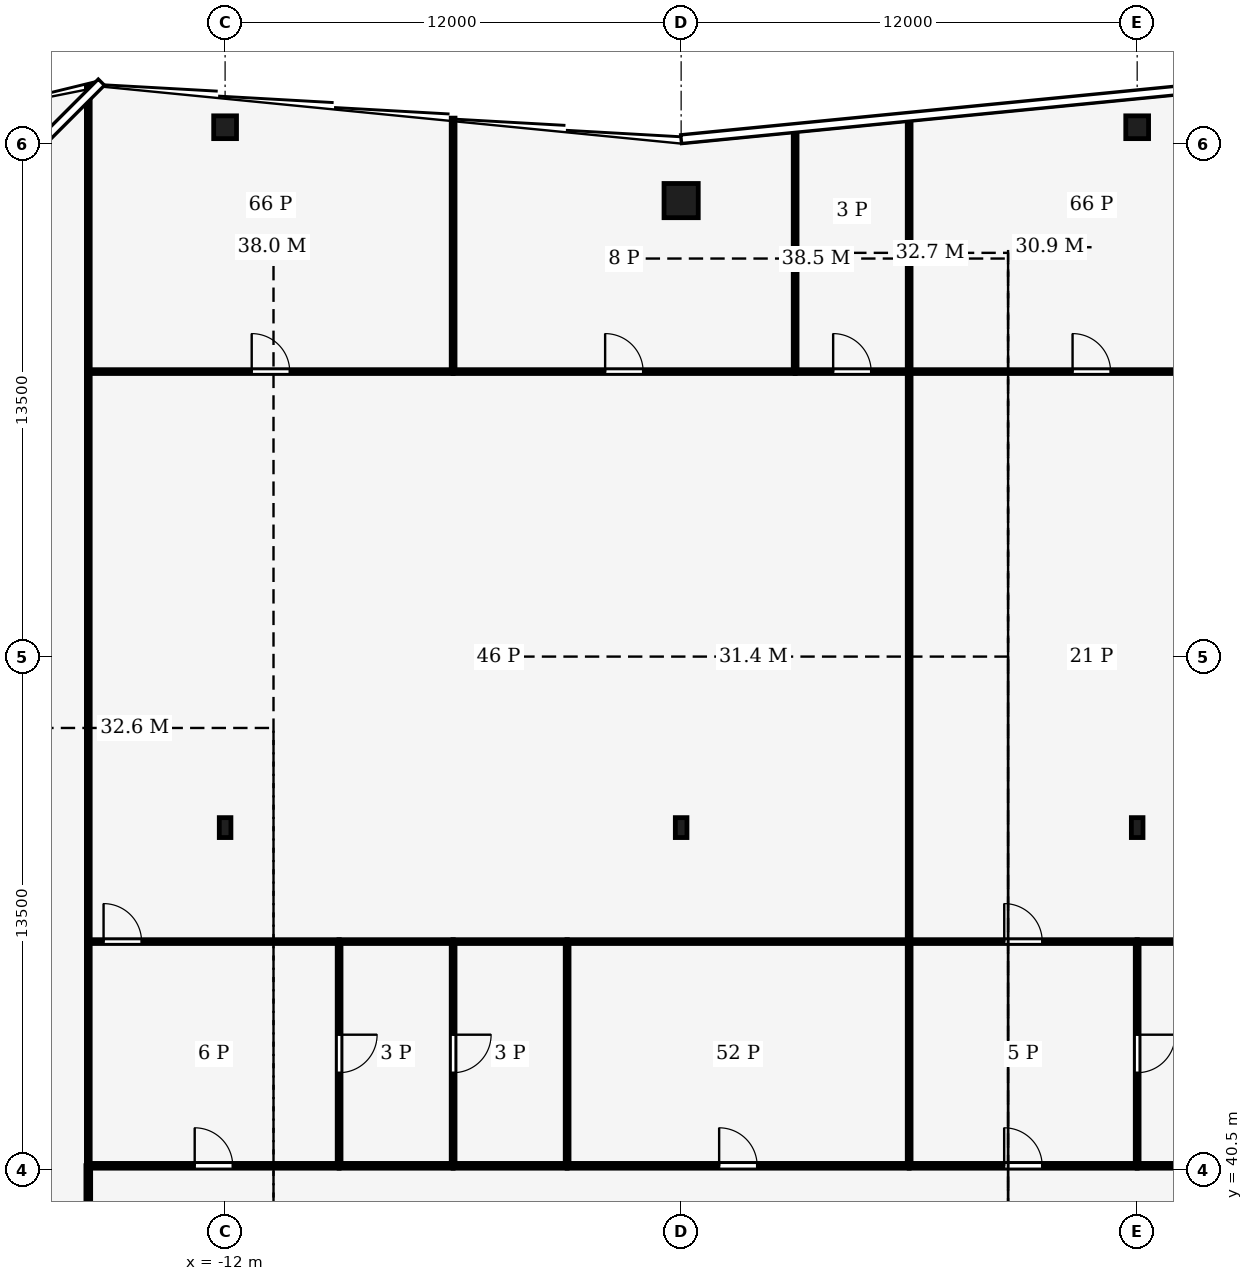
"""IFC4 building model, lengths in metres.
Left out: names, types, materials, properties, quantities, classifications, styles, units other than length and angle.
Written with IfcOpenShell. Run it as: python <this file> out.ifc"""

import sys

from ifc_helpers import new_model, si_unit, direction, frame, frame_2d, origin, origin_2d, place, context, subcontext, project, spatial, rectangle, hollow_rectangle, i_section, extrude, element, fill, save


model = new_model("IFC4")
c1 = context("Model", 3, precision=1e-05, world=origin(), true_north=direction((0.0, 1.0)))
c2 = subcontext(c1, "Body", "Model", "MODEL_VIEW")
j1 = project(units=[si_unit("LENGTHUNIT", "METRE"), si_unit("PLANEANGLEUNIT", "RADIAN")], contexts=[c1])
p1 = place(None, origin())
s1 = spatial("IfcSite", under=j1, at=p1, CompositionType="ELEMENT")
p2 = place(p1, origin())
s2 = spatial("IfcBuilding", under=s1, at=p2, CompositionType="ELEMENT")
p3 = place(p2, frame((0.0, 0.0, 314.0)))
s3 = spatial("IfcBuildingStorey", under=s2, at=p3, CompositionType="ELEMENT", Elevation=314.0)
p4 = place(p3, frame((0.0, 66.0, 0.0), z_axis=(0.0, 0.0, 1.0), x_axis=(1.0, 0.0, 0.0)))
e1 = element("IfcColumn", 1, at=p4, inside=s3, PredefinedType="COLUMN", context=c2, shape_type="SweptSolid", body=[
    extrude(hollow_rectangle(XDim=0.9, YDim=0.9, WallThickness=0.04, at=origin_2d()), origin(), (0.0, 0.0, 1.0), 4.0),
])
for number, where, z_axis, x_axis in (
    (2, (-12.0, 67.93, 0.0), (0.0, 0.0, 1.0), (1.0, 0.0, 0.0)),
    (3, (12.0, 67.93, 0.0), (0.0, 0.0, 1.0), (1.0, 0.0, 0.0)),
):
    element("IfcColumn", number, at=place(p3, frame(where, z_axis=z_axis, x_axis=x_axis)), inside=s3, PredefinedType="COLUMN", context=c2, shape_type="SweptSolid", body=[
        extrude(hollow_rectangle(XDim=0.6, YDim=0.6, WallThickness=0.025, at=origin_2d()), origin(), (0.0, 0.0, 1.0), 4.0),
    ])
for number, where, z_axis, x_axis in (
    (4, (-12.0, 49.5, 0.0), (0.0, 0.0, 1.0), (1.0, 0.0, 0.0)),
    (5, (0.0, 49.5, 0.0), (0.0, 0.0, 1.0), (1.0, 0.0, 0.0)),
    (6, (12.0, 49.5, 0.0), (0.0, 0.0, 1.0), (1.0, 0.0, 0.0)),
):
    element("IfcColumn", number, at=place(p3, frame(where, z_axis=z_axis, x_axis=x_axis)), inside=s3, PredefinedType="COLUMN", context=c2, shape_type="SweptSolid", body=[
        extrude(i_section(OverallWidth=0.306, OverallDepth=0.524, WebThickness=0.012, FlangeThickness=0.04, FilletRadius=0.027, at=origin_2d()), origin(), (0.0, 0.0, 1.0), 4.0),
    ])
p5 = place(p3, frame((-15.6, 34.5, 0.0), z_axis=(0.0, 0.0, 1.0), x_axis=(0.0, 1.0, 0.0)))
e7 = element("IfcWall", 7, at=p5, inside=s3, PredefinedType="PARTITIONING", context=c2, shape_type="SweptSolid", body=[
    extrude(rectangle(XDim=6.104, YDim=0.125, at=frame_2d((3.052, 0.0))), origin(), (0.0, 0.0, 1.0), 3.14),
])
p6 = place(p5, frame((2.552, 0.0, 0.0)))
e8 = element("IfcOpeningElement", 8, at=p6, cuts=e7, PredefinedType="OPENING", context=c2, shape_type="SweptSolid", body=[
    extrude(rectangle(XDim=1.0, YDim=2.1, at=frame_2d((0.5, 1.05))), frame((0.0, 0.073, 0.0), z_axis=(0.0, -1.0, 0.0), x_axis=(1.0, 0.0, 0.0)), (0.0, 0.0, 1.0), 0.145),
])
p7 = place(p3, frame((-15.6, 40.6, 0.0), z_axis=(0.0, 0.0, 1.0), x_axis=(1.0, 0.0, 0.0)))
e9 = element("IfcWall", 9, at=p7, inside=s3, PredefinedType="PARTITIONING", context=c2, shape_type="SweptSolid", body=[
    extrude(rectangle(XDim=6.6, YDim=0.125, at=frame_2d((3.3, 0.0))), origin(), (0.0, 0.0, 1.0), 3.39),
])
p8 = place(p7, frame((2.8, 0.0, 0.0)))
e10 = element("IfcOpeningElement", 10, at=p8, cuts=e9, PredefinedType="OPENING", context=c2, shape_type="SweptSolid", body=[
    extrude(rectangle(XDim=1.0, YDim=2.1, at=frame_2d((0.5, 1.05))), frame((0.0, 0.073, 0.0), z_axis=(0.0, -1.0, 0.0), x_axis=(1.0, 0.0, 0.0)), (0.0, 0.0, 1.0), 0.145),
])
for number, where, z_axis, x_axis in (
    (11, (-6.0, 40.6, 0.0), (0.0, 0.0, 1.0), (-1.0, 0.0, 0.0)),
    (12, (-3.0, 40.6, 0.0), (0.0, 0.0, 1.0), (-1.0, 0.0, 0.0)),
):
    element("IfcWall", number, at=place(p3, frame(where, z_axis=z_axis, x_axis=x_axis)), inside=s3, PredefinedType="PARTITIONING", context=c2, shape_type="SweptSolid", body=[
        extrude(rectangle(XDim=3.0, YDim=0.125, at=frame_2d((1.5, 0.0))), origin(), (0.0, 0.0, 1.0), 3.39),
    ])
p9 = place(p3, frame((-3.0, 40.6, 0.0), z_axis=(0.0, 0.0, 1.0), x_axis=(1.0, 0.0, 0.0)))
e13 = element("IfcWall", 13, at=p9, inside=s3, PredefinedType="PARTITIONING", context=c2, shape_type="SweptSolid", body=[
    extrude(rectangle(XDim=9.0, YDim=0.125, at=frame_2d((4.5, 0.0))), origin(), (0.0, 0.0, 1.0), 3.39),
])
p10 = place(p9, frame((4.0, 0.0, 0.0)))
e14 = element("IfcOpeningElement", 14, at=p10, cuts=e13, PredefinedType="OPENING", context=c2, shape_type="SweptSolid", body=[
    extrude(rectangle(XDim=1.0, YDim=2.1, at=frame_2d((0.5, 1.05))), frame((0.0, 0.073, 0.0), z_axis=(0.0, -1.0, 0.0), x_axis=(1.0, 0.0, 0.0)), (0.0, 0.0, 1.0), 0.145),
])
p11 = place(p3, frame((6.0, 40.6, 0.0), z_axis=(0.0, 0.0, 1.0), x_axis=(1.0, 0.0, 0.0)))
e15 = element("IfcWall", 15, at=p11, inside=s3, PredefinedType="PARTITIONING", context=c2, shape_type="SweptSolid", body=[
    extrude(rectangle(XDim=6.0, YDim=0.125, at=frame_2d((3.0, 0.0))), origin(), (0.0, 0.0, 1.0), 3.39),
])
p12 = place(p11, frame((2.5, 0.0, 0.0)))
e16 = element("IfcOpeningElement", 16, at=p12, cuts=e15, PredefinedType="OPENING", context=c2, shape_type="SweptSolid", body=[
    extrude(rectangle(XDim=1.0, YDim=2.1, at=frame_2d((0.5, 1.05))), frame((0.0, 0.073, 0.0), z_axis=(0.0, -1.0, 0.0), x_axis=(1.0, 0.0, 0.0)), (0.0, 0.0, 1.0), 0.145),
])
p13 = place(p3, frame((15.6, 40.6, 0.0), z_axis=(0.0, 0.0, 1.0), x_axis=(-1.0, 0.0, 0.0)))
e17 = element("IfcWall", 17, at=p13, inside=s3, PredefinedType="PARTITIONING", context=c2, shape_type="SweptSolid", body=[
    extrude(rectangle(XDim=3.6, YDim=0.125, at=frame_2d((1.8, 0.0))), origin(), (0.0, 0.0, 1.0), 3.39),
])
p14 = place(p3, frame((-15.6, 40.6, 0.0), z_axis=(0.0, 0.0, 1.0), x_axis=(0.0, 1.0, 0.0)))
e18 = element("IfcWall", 18, at=p14, inside=s3, PredefinedType="PARTITIONING", context=c2, shape_type="SweptSolid", body=[
    extrude(rectangle(XDim=5.9, YDim=0.1, at=frame_2d((2.95, 0.0))), origin(), (0.0, 0.0, 1.0), 3.87),
])
p15 = place(p3, frame((-15.6, 46.5, 0.0), z_axis=(0.0, 0.0, 1.0), x_axis=(0.0, 1.0, 0.0)))
e19 = element("IfcWall", 19, at=p15, inside=s3, PredefinedType="PARTITIONING", context=c2, shape_type="SweptSolid", body=[
    extrude(rectangle(XDim=15.0, YDim=0.1, at=frame_2d((7.5, 0.0))), origin(), (0.0, 0.0, 1.0), 3.35),
])
p16 = place(p3, frame((-15.6, 61.5, 0.0), z_axis=(0.0, 0.0, 1.0), x_axis=(0.0, 1.0, 0.0)))
e20 = element("IfcWall", 20, at=p16, inside=s3, PredefinedType="PARTITIONING", context=c2, shape_type="SweptSolid", body=[
    extrude(rectangle(XDim=7.51, YDim=0.1, at=frame_2d((3.755, 0.0))), origin(), (0.0, 0.0, 1.0), 2.93),
])
p17 = place(p3, frame((-9.0, 46.5, 0.0), z_axis=(0.0, 0.0, 1.0), x_axis=(0.0, -1.0, 0.0)))
e21 = element("IfcWall", 21, at=p17, inside=s3, PredefinedType="PARTITIONING", context=c2, shape_type="SweptSolid", body=[
    extrude(rectangle(XDim=5.9, YDim=0.1, at=frame_2d((2.95, 0.0))), origin(), (0.0, 0.0, 1.0), 3.87),
])
p18 = place(p17, frame((2.45, 0.0, 0.0)))
e22 = element("IfcOpeningElement", 22, at=p18, cuts=e21, PredefinedType="OPENING", context=c2, shape_type="SweptSolid", body=[
    extrude(rectangle(XDim=1.0, YDim=2.1, at=frame_2d((0.5, 1.05))), frame((0.0, 0.06, 0.0), z_axis=(0.0, -1.0, 0.0), x_axis=(1.0, 0.0, 0.0)), (0.0, 0.0, 1.0), 0.12),
])
p19 = place(p3, frame((-15.6, 46.5, 0.0), z_axis=(0.0, 0.0, 1.0), x_axis=(1.0, 0.0, 0.0)))
e23 = element("IfcWall", 23, at=p19, inside=s3, PredefinedType="PARTITIONING", context=c2, shape_type="SweptSolid", body=[
    extrude(rectangle(XDim=6.604, YDim=0.1, at=frame_2d((3.302, 0.0))), origin(), (0.0, 0.0, 1.0), 3.39),
])
p20 = place(p19, frame((0.402, 0.0, 0.0)))
e24 = element("IfcOpeningElement", 24, at=p20, cuts=e23, PredefinedType="OPENING", context=c2, shape_type="SweptSolid", body=[
    extrude(rectangle(XDim=1.0, YDim=2.1, at=frame_2d((0.5, 1.05))), frame((0.0, 0.06, 0.0), z_axis=(0.0, -1.0, 0.0), x_axis=(1.0, 0.0, 0.0)), (0.0, 0.0, 1.0), 0.12),
])
p21 = place(p3, frame((-6.0, 46.5, 0.0), z_axis=(0.0, 0.0, 1.0), x_axis=(0.0, -1.0, 0.0)))
e25 = element("IfcWall", 25, at=p21, inside=s3, PredefinedType="PARTITIONING", context=c2, shape_type="SweptSolid", body=[
    extrude(rectangle(XDim=5.9, YDim=0.1, at=frame_2d((2.95, 0.0))), origin(), (0.0, 0.0, 1.0), 3.87),
])
p22 = place(p21, frame((2.45, 0.0, 0.0)))
e26 = element("IfcOpeningElement", 26, at=p22, cuts=e25, PredefinedType="OPENING", context=c2, shape_type="SweptSolid", body=[
    extrude(rectangle(XDim=1.0, YDim=2.1, at=frame_2d((0.5, 1.05))), frame((0.0, 0.06, 0.0), z_axis=(0.0, -1.0, 0.0), x_axis=(1.0, 0.0, 0.0)), (0.0, 0.0, 1.0), 0.12),
])
p23 = place(p3, frame((-5.996, 46.5, 0.0), z_axis=(0.0, 0.0, 1.0), x_axis=(-1.0, 0.0, 0.0)))
e27 = element("IfcWall", 27, at=p23, inside=s3, PredefinedType="PARTITIONING", context=c2, shape_type="SweptSolid", body=[
    extrude(rectangle(XDim=3.008, YDim=0.1, at=frame_2d((1.504, 0.0))), origin(), (0.0, 0.0, 1.0), 3.39),
])
p24 = place(p3, frame((-3.0, 40.6, 0.0), z_axis=(0.0, 0.0, 1.0), x_axis=(0.0, 1.0, 0.0)))
e28 = element("IfcWall", 28, at=p24, inside=s3, PredefinedType="PARTITIONING", context=c2, shape_type="SweptSolid", body=[
    extrude(rectangle(XDim=5.9, YDim=0.1, at=frame_2d((2.95, 0.0))), origin(), (0.0, 0.0, 1.0), 3.87),
])
p25 = place(p3, frame((-2.996, 46.5, 0.0), z_axis=(0.0, 0.0, 1.0), x_axis=(-1.0, 0.0, 0.0)))
e29 = element("IfcWall", 29, at=p25, inside=s3, PredefinedType="PARTITIONING", context=c2, shape_type="SweptSolid", body=[
    extrude(rectangle(XDim=3.008, YDim=0.1, at=frame_2d((1.504, 0.0))), origin(), (0.0, 0.0, 1.0), 3.39),
])
p26 = place(p3, frame((6.0, 46.5, 0.0), z_axis=(0.0, 0.0, 1.0), x_axis=(-1.0, 0.0, 0.0)))
e30 = element("IfcWall", 30, at=p26, inside=s3, PredefinedType="PARTITIONING", context=c2, shape_type="SweptSolid", body=[
    extrude(rectangle(XDim=9.004, YDim=0.1, at=frame_2d((4.502, 0.0))), origin(), (0.0, 0.0, 1.0), 3.39),
])
p27 = place(p3, frame((6.0, 40.6, 0.0), z_axis=(0.0, 0.0, 1.0), x_axis=(0.0, 1.0, 0.0)))
e31 = element("IfcWall", 31, at=p27, inside=s3, PredefinedType="PARTITIONING", context=c2, shape_type="SweptSolid", body=[
    extrude(rectangle(XDim=5.9, YDim=0.1, at=frame_2d((2.95, 0.0))), origin(), (0.0, 0.0, 1.0), 3.87),
])
p28 = place(p3, frame((-15.6, 61.5, 0.0), z_axis=(0.0, 0.0, 1.0), x_axis=(1.0, 0.0, 0.0)))
e32 = element("IfcWall", 32, at=p28, inside=s3, PredefinedType="PARTITIONING", context=c2, shape_type="SweptSolid", body=[
    extrude(rectangle(XDim=9.6, YDim=0.1, at=frame_2d((4.8, 0.0))), origin(), (0.0, 0.0, 1.0), 3.24),
])
p29 = place(p28, frame((4.3, 0.0, 0.0)))
e33 = element("IfcOpeningElement", 33, at=p29, cuts=e32, PredefinedType="OPENING", context=c2, shape_type="SweptSolid", body=[
    extrude(rectangle(XDim=1.0, YDim=2.1, at=frame_2d((0.5, 1.05))), frame((0.0, 0.06, 0.0), z_axis=(0.0, -1.0, 0.0), x_axis=(1.0, 0.0, 0.0)), (0.0, 0.0, 1.0), 0.12),
])
p30 = place(p3, frame((-6.0, 61.5, 0.0), z_axis=(0.0, 0.0, 1.0), x_axis=(1.0, 0.0, 0.0)))
e34 = element("IfcWall", 34, at=p30, inside=s3, PredefinedType="PARTITIONING", context=c2, shape_type="SweptSolid", body=[
    extrude(rectangle(XDim=9.0, YDim=0.1, at=frame_2d((4.5, 0.0))), origin(), (0.0, 0.0, 1.0), 3.24),
])
p31 = place(p30, frame((4.0, 0.0, 0.0)))
e35 = element("IfcOpeningElement", 35, at=p31, cuts=e34, PredefinedType="OPENING", context=c2, shape_type="SweptSolid", body=[
    extrude(rectangle(XDim=1.0, YDim=2.1, at=frame_2d((0.5, 1.05))), frame((0.0, 0.06, 0.0), z_axis=(0.0, -1.0, 0.0), x_axis=(1.0, 0.0, 0.0)), (0.0, 0.0, 1.0), 0.12),
])
p32 = place(p3, frame((3.0, 61.5, 0.0), z_axis=(0.0, 0.0, 1.0), x_axis=(1.0, 0.0, 0.0)))
e36 = element("IfcWall", 36, at=p32, inside=s3, PredefinedType="PARTITIONING", context=c2, shape_type="SweptSolid", body=[
    extrude(rectangle(XDim=3.0, YDim=0.1, at=frame_2d((1.5, 0.0))), origin(), (0.0, 0.0, 1.0), 3.24),
])
p33 = place(p32, frame((1.0, 0.0, 0.0)))
e37 = element("IfcOpeningElement", 37, at=p33, cuts=e36, PredefinedType="OPENING", context=c2, shape_type="SweptSolid", body=[
    extrude(rectangle(XDim=1.0, YDim=2.1, at=frame_2d((0.5, 1.05))), frame((0.0, 0.06, 0.0), z_axis=(0.0, -1.0, 0.0), x_axis=(1.0, 0.0, 0.0)), (0.0, 0.0, 1.0), 0.12),
])
p34 = place(p3, frame((6.0, 46.5, 0.0), z_axis=(0.0, 0.0, 1.0), x_axis=(0.0, 1.0, 0.0)))
e38 = element("IfcWall", 38, at=p34, inside=s3, PredefinedType="PARTITIONING", context=c2, shape_type="SweptSolid", body=[
    extrude(rectangle(XDim=15.0, YDim=0.1, at=frame_2d((7.5, 0.0))), origin(), (0.0, 0.0, 1.0), 3.24),
])
p35 = place(p3, frame((-6.0, 61.5, 0.0), z_axis=(0.0, 0.0, 1.0), x_axis=(0.0, 1.0, 0.0)))
e39 = element("IfcWall", 39, at=p35, inside=s3, PredefinedType="PARTITIONING", context=c2, shape_type="SweptSolid", body=[
    extrude(rectangle(XDim=6.67, YDim=0.1, at=frame_2d((3.335, 0.0))), origin(), (0.0, 0.0, 1.0), 3.04),
])
p36 = place(p3, frame((3.0, 61.5, 0.0), z_axis=(0.0, 0.0, 1.0), x_axis=(0.0, 1.0, 0.0)))
e40 = element("IfcWall", 40, at=p36, inside=s3, PredefinedType="PARTITIONING", context=c2, shape_type="SweptSolid", body=[
    extrude(rectangle(XDim=6.375, YDim=0.1, at=frame_2d((3.188, 0.0))), origin(), (0.0, 0.0, 1.0), 3.04),
])
p37 = place(p3, frame((6.0, 61.5, 0.0), z_axis=(0.0, 0.0, 1.0), x_axis=(0.0, 1.0, 0.0)))
e41 = element("IfcWall", 41, at=p37, inside=s3, PredefinedType="PARTITIONING", context=c2, shape_type="SweptSolid", body=[
    extrude(rectangle(XDim=6.67, YDim=0.1, at=frame_2d((3.335, 0.0))), origin(), (0.0, 0.0, 1.0), 3.04),
])
p38 = place(p3, frame((12.0, 46.5, 0.0), z_axis=(0.0, 0.0, 1.0), x_axis=(0.0, -1.0, 0.0)))
e42 = element("IfcWall", 42, at=p38, inside=s3, PredefinedType="PARTITIONING", context=c2, shape_type="SweptSolid", body=[
    extrude(rectangle(XDim=5.9, YDim=0.1, at=frame_2d((2.95, 0.0))), origin(), (0.0, 0.0, 1.0), 3.39),
])
p39 = place(p38, frame((2.45, 0.0, 0.0)))
e43 = element("IfcOpeningElement", 43, at=p39, cuts=e42, PredefinedType="OPENING", context=c2, shape_type="SweptSolid", body=[
    extrude(rectangle(XDim=1.0, YDim=2.1, at=frame_2d((0.5, 1.05))), frame((0.0, 0.06, 0.0), z_axis=(0.0, -1.0, 0.0), x_axis=(1.0, 0.0, 0.0)), (0.0, 0.0, 1.0), 0.12),
])
p40 = place(p3, frame((6.0, 46.5, 0.0), z_axis=(0.0, 0.0, 1.0), x_axis=(1.0, 0.0, 0.0)))
e44 = element("IfcWall", 44, at=p40, inside=s3, PredefinedType="PARTITIONING", context=c2, shape_type="SweptSolid", body=[
    extrude(rectangle(XDim=6.004, YDim=0.1, at=frame_2d((3.002, 0.0))), origin(), (0.0, 0.0, 1.0), 3.39),
])
p41 = place(p40, frame((2.502, 0.0, 0.0)))
e45 = element("IfcOpeningElement", 45, at=p41, cuts=e44, PredefinedType="OPENING", context=c2, shape_type="SweptSolid", body=[
    extrude(rectangle(XDim=1.0, YDim=2.1, at=frame_2d((0.5, 1.05))), frame((0.0, 0.06, 0.0), z_axis=(0.0, -1.0, 0.0), x_axis=(1.0, 0.0, 0.0)), (0.0, 0.0, 1.0), 0.12),
])
p42 = place(p3, frame((15.6, 46.5, 0.0), z_axis=(0.0, 0.0, 1.0), x_axis=(-1.0, 0.0, 0.0)))
e46 = element("IfcWall", 46, at=p42, inside=s3, PredefinedType="PARTITIONING", context=c2, shape_type="SweptSolid", body=[
    extrude(rectangle(XDim=3.604, YDim=0.1, at=frame_2d((1.802, 0.0))), origin(), (0.0, 0.0, 1.0), 3.87),
])
p43 = place(p3, frame((6.0, 61.5, 0.0), z_axis=(0.0, 0.0, 1.0), x_axis=(1.0, 0.0, 0.0)))
e47 = element("IfcWall", 47, at=p43, inside=s3, PredefinedType="PARTITIONING", context=c2, shape_type="SweptSolid", body=[
    extrude(rectangle(XDim=9.6, YDim=0.1, at=frame_2d((4.8, 0.0))), origin(), (0.0, 0.0, 1.0), 3.24),
])
p44 = place(p43, frame((4.3, 0.0, 0.0)))
e48 = element("IfcOpeningElement", 48, at=p44, cuts=e47, PredefinedType="OPENING", context=c2, shape_type="SweptSolid", body=[
    extrude(rectangle(XDim=1.0, YDim=2.1, at=frame_2d((0.5, 1.05))), frame((0.0, 0.06, 0.0), z_axis=(0.0, -1.0, 0.0), x_axis=(1.0, 0.0, 0.0)), (0.0, 0.0, 1.0), 0.12),
])
p45 = place(p8, origin())
e49 = element("IfcDoor", 49, at=p45, inside=s3, OperationType="SINGLE_SWING_RIGHT", PredefinedType="DOOR", context=c2, shape_type="SweptSolid", body=[
    extrude(rectangle(XDim=1.0, YDim=2.1, at=frame_2d((0.5, 1.05))), frame((0.0, 0.025, 0.0), z_axis=(0.0, -1.0, 0.0), x_axis=(1.0, 0.0, 0.0)), (0.0, 0.0, 1.0), 0.05),
])
fill(e10, e49)
p46 = place(p10, origin())
e50 = element("IfcDoor", 50, at=p46, inside=s3, OperationType="SINGLE_SWING_LEFT", PredefinedType="DOOR", context=c2, shape_type="SweptSolid", body=[
    extrude(rectangle(XDim=1.0, YDim=2.1, at=frame_2d((0.5, 1.05))), frame((0.0, 0.025, 0.0), z_axis=(0.0, -1.0, 0.0), x_axis=(1.0, 0.0, 0.0)), (0.0, 0.0, 1.0), 0.05),
])
fill(e14, e50)
p47 = place(p12, origin())
e51 = element("IfcDoor", 51, at=p47, inside=s3, OperationType="SINGLE_SWING_RIGHT", PredefinedType="DOOR", context=c2, shape_type="SweptSolid", body=[
    extrude(rectangle(XDim=1.0, YDim=2.1, at=frame_2d((0.5, 1.05))), frame((0.0, 0.025, 0.0), z_axis=(0.0, -1.0, 0.0), x_axis=(1.0, 0.0, 0.0)), (0.0, 0.0, 1.0), 0.05),
])
fill(e16, e51)
p48 = place(p18, origin())
e52 = element("IfcDoor", 52, at=p48, inside=s3, OperationType="SINGLE_SWING_LEFT", PredefinedType="DOOR", context=c2, shape_type="SweptSolid", body=[
    extrude(rectangle(XDim=1.0, YDim=2.1, at=frame_2d((0.5, 1.05))), frame((0.0, 0.025, 0.0), z_axis=(0.0, -1.0, 0.0), x_axis=(1.0, 0.0, 0.0)), (0.0, 0.0, 1.0), 0.05),
])
fill(e22, e52)
p49 = place(p20, origin())
e53 = element("IfcDoor", 53, at=p49, inside=s3, OperationType="SINGLE_SWING_LEFT", PredefinedType="DOOR", context=c2, shape_type="SweptSolid", body=[
    extrude(rectangle(XDim=1.0, YDim=2.1, at=frame_2d((0.5, 1.05))), frame((0.0, 0.025, 0.0), z_axis=(0.0, -1.0, 0.0), x_axis=(1.0, 0.0, 0.0)), (0.0, 0.0, 1.0), 0.05),
])
fill(e24, e53)
p50 = place(p22, origin())
e54 = element("IfcDoor", 54, at=p50, inside=s3, OperationType="SINGLE_SWING_LEFT", PredefinedType="DOOR", context=c2, shape_type="SweptSolid", body=[
    extrude(rectangle(XDim=1.0, YDim=2.1, at=frame_2d((0.5, 1.05))), frame((0.0, 0.025, 0.0), z_axis=(0.0, -1.0, 0.0), x_axis=(1.0, 0.0, 0.0)), (0.0, 0.0, 1.0), 0.05),
])
fill(e26, e54)
p51 = place(p29, origin())
e55 = element("IfcDoor", 55, at=p51, inside=s3, OperationType="SINGLE_SWING_RIGHT", PredefinedType="DOOR", context=c2, shape_type="SweptSolid", body=[
    extrude(rectangle(XDim=1.0, YDim=2.1, at=frame_2d((0.5, 1.05))), frame((0.0, 0.025, 0.0), z_axis=(0.0, -1.0, 0.0), x_axis=(1.0, 0.0, 0.0)), (0.0, 0.0, 1.0), 0.05),
])
fill(e33, e55)
p52 = place(p31, origin())
e56 = element("IfcDoor", 56, at=p52, inside=s3, OperationType="SINGLE_SWING_LEFT", PredefinedType="DOOR", context=c2, shape_type="SweptSolid", body=[
    extrude(rectangle(XDim=1.0, YDim=2.1, at=frame_2d((0.5, 1.05))), frame((0.0, 0.025, 0.0), z_axis=(0.0, -1.0, 0.0), x_axis=(1.0, 0.0, 0.0)), (0.0, 0.0, 1.0), 0.05),
])
fill(e35, e56)
p53 = place(p33, origin())
e57 = element("IfcDoor", 57, at=p53, inside=s3, OperationType="SINGLE_SWING_RIGHT", PredefinedType="DOOR", context=c2, shape_type="SweptSolid", body=[
    extrude(rectangle(XDim=1.0, YDim=2.1, at=frame_2d((0.5, 1.05))), frame((0.0, 0.025, 0.0), z_axis=(0.0, -1.0, 0.0), x_axis=(1.0, 0.0, 0.0)), (0.0, 0.0, 1.0), 0.05),
])
fill(e37, e57)
p54 = place(p39, origin())
e58 = element("IfcDoor", 58, at=p54, inside=s3, OperationType="SINGLE_SWING_LEFT", PredefinedType="DOOR", context=c2, shape_type="SweptSolid", body=[
    extrude(rectangle(XDim=1.0, YDim=2.1, at=frame_2d((0.5, 1.05))), frame((0.0, 0.025, 0.0), z_axis=(0.0, -1.0, 0.0), x_axis=(1.0, 0.0, 0.0)), (0.0, 0.0, 1.0), 0.05),
])
fill(e43, e58)
p55 = place(p41, origin())
e59 = element("IfcDoor", 59, at=p55, inside=s3, OperationType="SINGLE_SWING_RIGHT", PredefinedType="DOOR", context=c2, shape_type="SweptSolid", body=[
    extrude(rectangle(XDim=1.0, YDim=2.1, at=frame_2d((0.5, 1.05))), frame((0.0, 0.025, 0.0), z_axis=(0.0, -1.0, 0.0), x_axis=(1.0, 0.0, 0.0)), (0.0, 0.0, 1.0), 0.05),
])
fill(e45, e59)
p56 = place(p44, origin())
e60 = element("IfcDoor", 60, at=p56, inside=s3, OperationType="SINGLE_SWING_LEFT", PredefinedType="DOOR", context=c2, shape_type="SweptSolid", body=[
    extrude(rectangle(XDim=1.0, YDim=2.1, at=frame_2d((0.5, 1.05))), frame((0.0, 0.025, 0.0), z_axis=(0.0, -1.0, 0.0), x_axis=(1.0, 0.0, 0.0)), (0.0, 0.0, 1.0), 0.05),
])
fill(e48, e60)
save(model, sys.argv[1])
